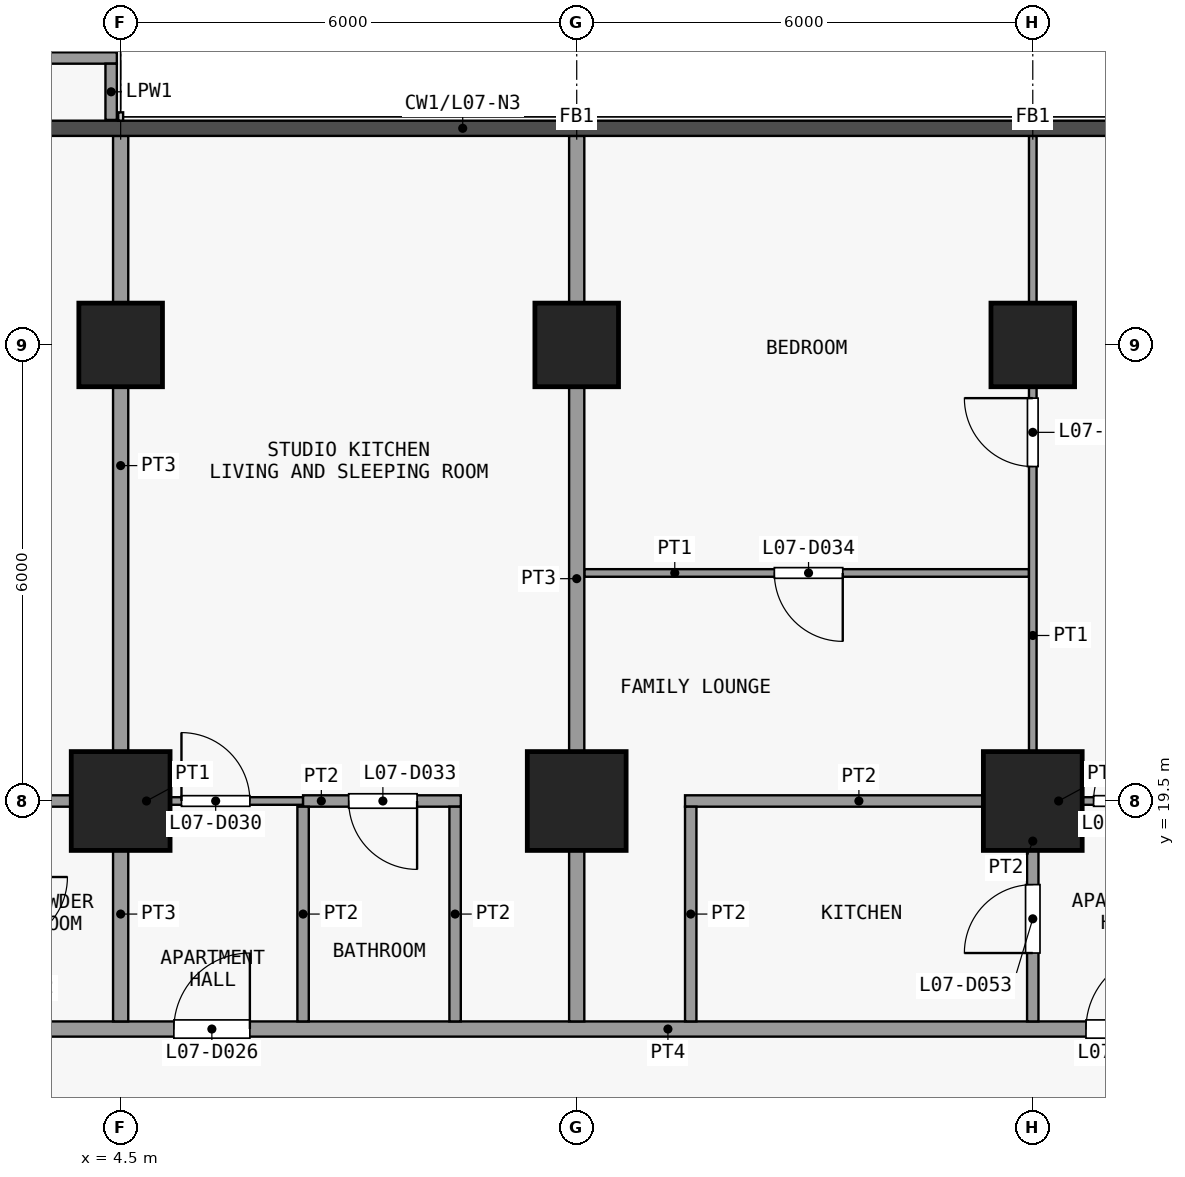
"""IFC4 building model, lengths in metres.
Left out: names, types, materials, properties, quantities, classifications, styles, units other than length and angle.
Written with IfcOpenShell. Run it as: python <this file> out.ifc"""

import sys

from ifc_helpers import new_model, si_unit, direction, frame, frame_2d, origin, origin_2d, place, context, subcontext, project, spatial, rectangle, extrude, element, fill, save


model = new_model("IFC4")
c1 = context("Model", 3, precision=1e-05, world=origin(), true_north=direction((0.0, 1.0)))
c2 = subcontext(c1, "Body", "Model", "MODEL_VIEW")
j1 = project(units=[si_unit("LENGTHUNIT", "METRE"), si_unit("PLANEANGLEUNIT", "RADIAN")], contexts=[c1])
p1 = place(None, origin())
s1 = spatial("IfcSite", under=j1, at=p1, CompositionType="ELEMENT")
p2 = place(p1, origin())
s2 = spatial("IfcBuilding", under=s1, at=p2, CompositionType="ELEMENT")
p3 = place(p2, frame((0.0, 0.0, 36.1)))
s3 = spatial("IfcBuildingStorey", under=s2, at=p3, CompositionType="ELEMENT", Elevation=36.1)
p4 = place(p3, frame((4.5, 19.5, 0.0), z_axis=(0.0, 0.0, 1.0), x_axis=(1.0, 0.0, 0.0)))
e1 = element("IfcColumn", 1, at=p4, inside=s3, PredefinedType="COLUMN", context=c2, shape_type="SweptSolid", body=[
    extrude(rectangle(XDim=1.3, YDim=1.3, at=origin_2d()), origin(), (0.0, 0.0, 1.0), 3.6),
])
p5 = place(p3, frame((4.5, 25.5, 0.0), z_axis=(0.0, 0.0, 1.0), x_axis=(1.0, 0.0, 0.0)))
e2 = element("IfcColumn", 2, at=p5, inside=s3, PredefinedType="COLUMN", context=c2, shape_type="SweptSolid", body=[
    extrude(rectangle(XDim=1.1, YDim=1.1, at=origin_2d()), origin(), (0.0, 0.0, 1.0), 3.6),
])
p6 = place(p3, frame((10.5, 19.5, 0.0), z_axis=(0.0, 0.0, 1.0), x_axis=(1.0, 0.0, 0.0)))
e3 = element("IfcColumn", 3, at=p6, inside=s3, PredefinedType="COLUMN", context=c2, shape_type="SweptSolid", body=[
    extrude(rectangle(XDim=1.3, YDim=1.3, at=origin_2d()), origin(), (0.0, 0.0, 1.0), 3.6),
])
p7 = place(p3, frame((10.5, 25.5, 0.0), z_axis=(0.0, 0.0, 1.0), x_axis=(1.0, 0.0, 0.0)))
e4 = element("IfcColumn", 4, at=p7, inside=s3, PredefinedType="COLUMN", context=c2, shape_type="SweptSolid", body=[
    extrude(rectangle(XDim=1.1, YDim=1.1, at=origin_2d()), origin(), (0.0, 0.0, 1.0), 3.6),
])
p8 = place(p3, frame((16.5, 19.5, 0.0), z_axis=(0.0, 0.0, 1.0), x_axis=(1.0, 0.0, 0.0)))
e5 = element("IfcColumn", 5, at=p8, inside=s3, PredefinedType="COLUMN", context=c2, shape_type="SweptSolid", body=[
    extrude(rectangle(XDim=1.3, YDim=1.3, at=origin_2d()), origin(), (0.0, 0.0, 1.0), 3.6),
])
p9 = place(p3, frame((16.5, 25.5, 0.0), z_axis=(0.0, 0.0, 1.0), x_axis=(1.0, 0.0, 0.0)))
e6 = element("IfcColumn", 6, at=p9, inside=s3, PredefinedType="COLUMN", context=c2, shape_type="SweptSolid", body=[
    extrude(rectangle(XDim=1.1, YDim=1.1, at=origin_2d()), origin(), (0.0, 0.0, 1.0), 3.6),
])
p10 = place(p3, frame((-4.54, 29.275, 0.0), z_axis=(0.0, 0.0, 1.0), x_axis=(1.0, 0.0, 0.0)))
e7 = element("IfcWall", 7, at=p10, inside=s3, PredefinedType="PARAPET", context=c2, shape_type="SweptSolid", body=[
    extrude(rectangle(XDim=8.99, YDim=0.15, at=frame_2d((4.495, 0.0))), origin(), (0.0, 0.0, 1.0), 1.15),
])
p11 = place(p3, frame((4.375, 29.2, 0.0), z_axis=(0.0, 0.0, 1.0), x_axis=(0.0, -1.0, 0.0)))
e8 = element("IfcWall", 8, at=p11, inside=s3, PredefinedType="PARAPET", context=c2, shape_type="SweptSolid", body=[
    extrude(rectangle(XDim=0.74, YDim=0.15, at=frame_2d((0.37, 0.0))), origin(), (0.0, 0.0, 1.0), 1.15),
])
p12 = place(p3, frame((-26.25, 16.5, 0.0), z_axis=(0.0, 0.0, 1.0), x_axis=(1.0, 0.0, 0.0)))
e9 = element("IfcWall", 9, at=p12, inside=s3, PredefinedType="PARTITIONING", context=c2, shape_type="SweptSolid", body=[
    extrude(rectangle(XDim=51.6, YDim=0.2, at=frame_2d((25.8, 0.0))), origin(), (0.0, 0.0, 1.0), 3.3),
])
p13 = place(p12, frame((5.45, 0.0, 0.0)))
e10 = element("IfcOpeningElement", 10, at=p13, cuts=e9, PredefinedType="OPENING", context=c2, shape_type="SweptSolid", body=[
    extrude(rectangle(XDim=1.0, YDim=2.1, at=frame_2d((0.5, 1.05))), frame((0.0, 0.11, 0.0), z_axis=(0.0, -1.0, 0.0), x_axis=(1.0, 0.0, 0.0)), (0.0, 0.0, 1.0), 0.22),
])
p14 = place(p12, frame((12.25, 0.0, 0.0)))
e11 = element("IfcOpeningElement", 11, at=p14, cuts=e9, PredefinedType="OPENING", context=c2, shape_type="SweptSolid", body=[
    extrude(rectangle(XDim=0.9, YDim=2.1, at=frame_2d((0.45, 1.05))), frame((0.0, 0.11, 0.0), z_axis=(0.0, -1.0, 0.0), x_axis=(1.0, 0.0, 0.0)), (0.0, 0.0, 1.0), 0.22),
])
p15 = place(p12, frame((18.25, 0.0, 0.0)))
e12 = element("IfcOpeningElement", 12, at=p15, cuts=e9, PredefinedType="OPENING", context=c2, shape_type="SweptSolid", body=[
    extrude(rectangle(XDim=0.9, YDim=2.1, at=frame_2d((0.45, 1.05))), frame((0.0, 0.11, 0.0), z_axis=(0.0, -1.0, 0.0), x_axis=(1.0, 0.0, 0.0)), (0.0, 0.0, 1.0), 0.22),
])
p16 = place(p12, frame((24.95, 0.0, 0.0)))
e13 = element("IfcOpeningElement", 13, at=p16, cuts=e9, PredefinedType="OPENING", context=c2, shape_type="SweptSolid", body=[
    extrude(rectangle(XDim=1.0, YDim=2.1, at=frame_2d((0.5, 1.05))), frame((0.0, 0.11, 0.0), z_axis=(0.0, -1.0, 0.0), x_axis=(1.0, 0.0, 0.0)), (0.0, 0.0, 1.0), 0.22),
])
p17 = place(p12, frame((31.45, 0.0, 0.0)))
e14 = element("IfcOpeningElement", 14, at=p17, cuts=e9, PredefinedType="OPENING", context=c2, shape_type="SweptSolid", body=[
    extrude(rectangle(XDim=1.0, YDim=2.1, at=frame_2d((0.5, 1.05))), frame((0.0, 0.11, 0.0), z_axis=(0.0, -1.0, 0.0), x_axis=(1.0, 0.0, 0.0)), (0.0, 0.0, 1.0), 0.22),
])
p18 = place(p12, frame((43.45, 0.0, 0.0)))
e15 = element("IfcOpeningElement", 15, at=p18, cuts=e9, PredefinedType="OPENING", context=c2, shape_type="SweptSolid", body=[
    extrude(rectangle(XDim=1.0, YDim=2.1, at=frame_2d((0.5, 1.05))), frame((0.0, 0.11, 0.0), z_axis=(0.0, -1.0, 0.0), x_axis=(1.0, 0.0, 0.0)), (0.0, 0.0, 1.0), 0.22),
])
p19 = place(p3, frame((4.5, 19.5, 0.0), z_axis=(0.0, 0.0, 1.0), x_axis=(1.0, 0.0, 0.0)))
e16 = element("IfcWall", 16, at=p19, inside=s3, PredefinedType="PARTITIONING", context=c2, shape_type="SweptSolid", body=[
    extrude(rectangle(XDim=2.4, YDim=0.1, at=frame_2d((1.2, 0.0))), origin(), (0.0, 0.0, 1.0), 3.3),
])
p20 = place(p19, frame((0.8, 0.0, 0.0)))
e17 = element("IfcOpeningElement", 17, at=p20, cuts=e16, PredefinedType="OPENING", context=c2, shape_type="SweptSolid", body=[
    extrude(rectangle(XDim=0.9, YDim=2.1, at=frame_2d((0.45, 1.05))), frame((0.0, 0.06, 0.0), z_axis=(0.0, -1.0, 0.0), x_axis=(1.0, 0.0, 0.0)), (0.0, 0.0, 1.0), 0.12),
])
p21 = place(p3, frame((16.5, 19.5, 0.0), z_axis=(0.0, 0.0, 1.0), x_axis=(1.0, 0.0, 0.0)))
e18 = element("IfcWall", 18, at=p21, inside=s3, PredefinedType="PARTITIONING", context=c2, shape_type="SweptSolid", body=[
    extrude(rectangle(XDim=2.4, YDim=0.1, at=frame_2d((1.2, 0.0))), origin(), (0.0, 0.0, 1.0), 3.3),
])
p22 = place(p21, frame((0.8, 0.0, 0.0)))
e19 = element("IfcOpeningElement", 19, at=p22, cuts=e18, PredefinedType="OPENING", context=c2, shape_type="SweptSolid", body=[
    extrude(rectangle(XDim=0.9, YDim=2.1, at=frame_2d((0.45, 1.05))), frame((0.0, 0.06, 0.0), z_axis=(0.0, -1.0, 0.0), x_axis=(1.0, 0.0, 0.0)), (0.0, 0.0, 1.0), 0.12),
])
p23 = place(p3, frame((0.4, 19.5, 0.0), z_axis=(0.0, 0.0, 1.0), x_axis=(1.0, 0.0, 0.0)))
e20 = element("IfcWall", 20, at=p23, inside=s3, PredefinedType="PARTITIONING", context=c2, shape_type="SweptSolid", body=[
    extrude(rectangle(XDim=4.1, YDim=0.15, at=frame_2d((2.05, 0.0))), origin(), (0.0, 0.0, 1.0), 3.3),
])
p24 = place(p3, frame((6.9, 19.5, 0.0), z_axis=(0.0, 0.0, 1.0), x_axis=(1.0, 0.0, 0.0)))
e21 = element("IfcWall", 21, at=p24, inside=s3, PredefinedType="PARTITIONING", context=c2, shape_type="SweptSolid", body=[
    extrude(rectangle(XDim=2.075, YDim=0.15, at=frame_2d((1.038, 0.0))), origin(), (0.0, 0.0, 1.0), 3.3),
])
p25 = place(p24, frame((0.6, 0.0, 0.0)))
e22 = element("IfcOpeningElement", 22, at=p25, cuts=e21, PredefinedType="OPENING", context=c2, shape_type="SweptSolid", body=[
    extrude(rectangle(XDim=0.9, YDim=2.1, at=frame_2d((0.45, 1.05))), frame((0.0, 0.085, 0.0), z_axis=(0.0, -1.0, 0.0), x_axis=(1.0, 0.0, 0.0)), (0.0, 0.0, 1.0), 0.17),
])
p26 = place(p3, frame((11.925, 19.5, 0.0), z_axis=(0.0, 0.0, 1.0), x_axis=(1.0, 0.0, 0.0)))
e23 = element("IfcWall", 23, at=p26, inside=s3, PredefinedType="PARTITIONING", context=c2, shape_type="SweptSolid", body=[
    extrude(rectangle(XDim=4.575, YDim=0.15, at=frame_2d((2.288, 0.0))), origin(), (0.0, 0.0, 1.0), 3.3),
])
p27 = place(p3, frame((10.6, 22.5, 0.0), z_axis=(0.0, 0.0, 1.0), x_axis=(1.0, 0.0, 0.0)))
e24 = element("IfcWall", 24, at=p27, inside=s3, PredefinedType="PARTITIONING", context=c2, shape_type="SweptSolid", body=[
    extrude(rectangle(XDim=5.85, YDim=0.1, at=frame_2d((2.925, 0.0))), origin(), (0.0, 0.0, 1.0), 3.3),
])
p28 = place(p27, frame((2.5, 0.0, 0.0)))
e25 = element("IfcOpeningElement", 25, at=p28, cuts=e24, PredefinedType="OPENING", context=c2, shape_type="SweptSolid", body=[
    extrude(rectangle(XDim=0.9, YDim=2.1, at=frame_2d((0.45, 1.05))), frame((0.0, 0.06, 0.0), z_axis=(0.0, -1.0, 0.0), x_axis=(1.0, 0.0, 0.0)), (0.0, 0.0, 1.0), 0.12),
])
p29 = place(p3, frame((4.5, 16.6, 0.0), z_axis=(0.0, 0.0, 1.0), x_axis=(0.0, 1.0, 0.0)))
e26 = element("IfcWall", 26, at=p29, inside=s3, PredefinedType="PARTITIONING", context=c2, shape_type="SweptSolid", body=[
    extrude(rectangle(XDim=2.825, YDim=0.2, at=frame_2d((1.413, 0.0))), origin(), (0.0, 0.0, 1.0), 3.3),
])
p30 = place(p3, frame((4.5, 19.575, 0.0), z_axis=(0.0, 0.0, 1.0), x_axis=(0.0, 1.0, 0.0)))
e27 = element("IfcWall", 27, at=p30, inside=s3, PredefinedType="PARTITIONING", context=c2, shape_type="SweptSolid", body=[
    extrude(rectangle(XDim=8.675, YDim=0.2, at=frame_2d((4.337, 0.0))), origin(), (0.0, 0.0, 1.0), 3.3),
])
for number, where, z_axis, x_axis in (
    (28, (6.9, 16.6, 0.0), (0.0, 0.0, 1.0), (0.0, 1.0, 0.0)),
    (29, (8.9, 16.6, 0.0), (0.0, 0.0, 1.0), (0.0, 1.0, 0.0)),
):
    element("IfcWall", number, at=place(p3, frame(where, z_axis=z_axis, x_axis=x_axis)), inside=s3, PredefinedType="PARTITIONING", context=c2, shape_type="SweptSolid", body=[
        extrude(rectangle(XDim=2.825, YDim=0.15, at=frame_2d((1.413, 0.0))), origin(), (0.0, 0.0, 1.0), 3.3),
    ])
p31 = place(p3, frame((10.5, 16.6, 0.0), z_axis=(0.0, 0.0, 1.0), x_axis=(0.0, 1.0, 0.0)))
e30 = element("IfcWall", 30, at=p31, inside=s3, PredefinedType="PARTITIONING", context=c2, shape_type="SweptSolid", body=[
    extrude(rectangle(XDim=11.65, YDim=0.2, at=frame_2d((5.825, 0.0))), origin(), (0.0, 0.0, 1.0), 3.3),
])
p32 = place(p3, frame((12.0, 16.6, 0.0), z_axis=(0.0, 0.0, 1.0), x_axis=(0.0, 1.0, 0.0)))
e31 = element("IfcWall", 31, at=p32, inside=s3, PredefinedType="PARTITIONING", context=c2, shape_type="SweptSolid", body=[
    extrude(rectangle(XDim=2.825, YDim=0.15, at=frame_2d((1.413, 0.0))), origin(), (0.0, 0.0, 1.0), 3.3),
])
p33 = place(p3, frame((16.5, 19.575, 0.0), z_axis=(0.0, 0.0, 1.0), x_axis=(0.0, 1.0, 0.0)))
e32 = element("IfcWall", 32, at=p33, inside=s3, PredefinedType="PARTITIONING", context=c2, shape_type="SweptSolid", body=[
    extrude(rectangle(XDim=8.675, YDim=0.1, at=frame_2d((4.337, 0.0))), origin(), (0.0, 0.0, 1.0), 3.3),
])
p34 = place(p33, frame((4.325, 0.0, 0.0)))
e33 = element("IfcOpeningElement", 33, at=p34, cuts=e32, PredefinedType="OPENING", context=c2, shape_type="SweptSolid", body=[
    extrude(rectangle(XDim=0.9, YDim=2.1, at=frame_2d((0.45, 1.05))), frame((0.0, 0.06, 0.0), z_axis=(0.0, -1.0, 0.0), x_axis=(1.0, 0.0, 0.0)), (0.0, 0.0, 1.0), 0.12),
])
p35 = place(p3, frame((16.5, 16.6, 0.0), z_axis=(0.0, 0.0, 1.0), x_axis=(0.0, 1.0, 0.0)))
e34 = element("IfcWall", 34, at=p35, inside=s3, PredefinedType="PARTITIONING", context=c2, shape_type="SweptSolid", body=[
    extrude(rectangle(XDim=2.825, YDim=0.15, at=frame_2d((1.413, 0.0))), origin(), (0.0, 0.0, 1.0), 3.3),
])
p36 = place(p35, frame((0.9, 0.0, 0.0)))
e35 = element("IfcOpeningElement", 35, at=p36, cuts=e34, PredefinedType="OPENING", context=c2, shape_type="SweptSolid", body=[
    extrude(rectangle(XDim=0.9, YDim=2.1, at=frame_2d((0.45, 1.05))), frame((0.0, 0.085, 0.0), z_axis=(0.0, -1.0, 0.0), x_axis=(1.0, 0.0, 0.0)), (0.0, 0.0, 1.0), 0.17),
])
p37 = place(p17, origin())
e36 = element("IfcDoor", 36, at=p37, inside=s3, OperationType="SINGLE_SWING_LEFT", PredefinedType="DOOR", context=c2, shape_type="SweptSolid", body=[
    extrude(rectangle(XDim=1.0, YDim=2.1, at=frame_2d((0.5, 1.05))), frame((0.0, 0.025, 0.0), z_axis=(0.0, -1.0, 0.0), x_axis=(1.0, 0.0, 0.0)), (0.0, 0.0, 1.0), 0.05),
])
fill(e14, e36)
p38 = place(p18, origin())
e37 = element("IfcDoor", 37, at=p38, inside=s3, OperationType="SINGLE_SWING_LEFT", PredefinedType="DOOR", context=c2, shape_type="SweptSolid", body=[
    extrude(rectangle(XDim=1.0, YDim=2.1, at=frame_2d((0.5, 1.05))), frame((0.0, 0.025, 0.0), z_axis=(0.0, -1.0, 0.0), x_axis=(1.0, 0.0, 0.0)), (0.0, 0.0, 1.0), 0.05),
])
fill(e15, e37)
p39 = place(p20, origin())
e38 = element("IfcDoor", 38, at=p39, inside=s3, OperationType="SINGLE_SWING_RIGHT", PredefinedType="DOOR", context=c2, shape_type="SweptSolid", body=[
    extrude(rectangle(XDim=0.9, YDim=2.1, at=frame_2d((0.45, 1.05))), frame((0.0, 0.025, 0.0), z_axis=(0.0, -1.0, 0.0), x_axis=(1.0, 0.0, 0.0)), (0.0, 0.0, 1.0), 0.05),
])
fill(e17, e38)
p40 = place(p22, origin())
e39 = element("IfcDoor", 39, at=p40, inside=s3, OperationType="SINGLE_SWING_LEFT", PredefinedType="DOOR", context=c2, shape_type="SweptSolid", body=[
    extrude(rectangle(XDim=0.9, YDim=2.1, at=frame_2d((0.45, 1.05))), frame((0.0, 0.025, 0.0), z_axis=(0.0, -1.0, 0.0), x_axis=(1.0, 0.0, 0.0)), (0.0, 0.0, 1.0), 0.05),
])
fill(e19, e39)
p41 = place(p25, origin())
e40 = element("IfcDoor", 40, at=p41, inside=s3, OperationType="SINGLE_SWING_RIGHT", PredefinedType="DOOR", context=c2, shape_type="SweptSolid", body=[
    extrude(rectangle(XDim=0.9, YDim=2.1, at=frame_2d((0.45, 1.05))), frame((0.0, 0.025, 0.0), z_axis=(0.0, -1.0, 0.0), x_axis=(1.0, 0.0, 0.0)), (0.0, 0.0, 1.0), 0.05),
])
fill(e22, e40)
p42 = place(p28, origin())
e41 = element("IfcDoor", 41, at=p42, inside=s3, OperationType="SINGLE_SWING_RIGHT", PredefinedType="DOOR", context=c2, shape_type="SweptSolid", body=[
    extrude(rectangle(XDim=0.9, YDim=2.1, at=frame_2d((0.45, 1.05))), frame((0.0, 0.025, 0.0), z_axis=(0.0, -1.0, 0.0), x_axis=(1.0, 0.0, 0.0)), (0.0, 0.0, 1.0), 0.05),
])
fill(e25, e41)
p43 = place(p34, origin())
e42 = element("IfcDoor", 42, at=p43, inside=s3, OperationType="SINGLE_SWING_LEFT", PredefinedType="DOOR", context=c2, shape_type="SweptSolid", body=[
    extrude(rectangle(XDim=0.9, YDim=2.1, at=frame_2d((0.45, 1.05))), frame((0.0, 0.025, 0.0), z_axis=(0.0, -1.0, 0.0), x_axis=(1.0, 0.0, 0.0)), (0.0, 0.0, 1.0), 0.05),
])
fill(e33, e42)
p44 = place(p36, origin())
e43 = element("IfcDoor", 43, at=p44, inside=s3, OperationType="SINGLE_SWING_RIGHT", PredefinedType="DOOR", context=c2, shape_type="SweptSolid", body=[
    extrude(rectangle(XDim=0.9, YDim=2.1, at=frame_2d((0.45, 1.05))), frame((0.0, 0.025, 0.0), z_axis=(0.0, -1.0, 0.0), x_axis=(1.0, 0.0, 0.0)), (0.0, 0.0, 1.0), 0.05),
])
fill(e35, e43)
save(model, sys.argv[1])
